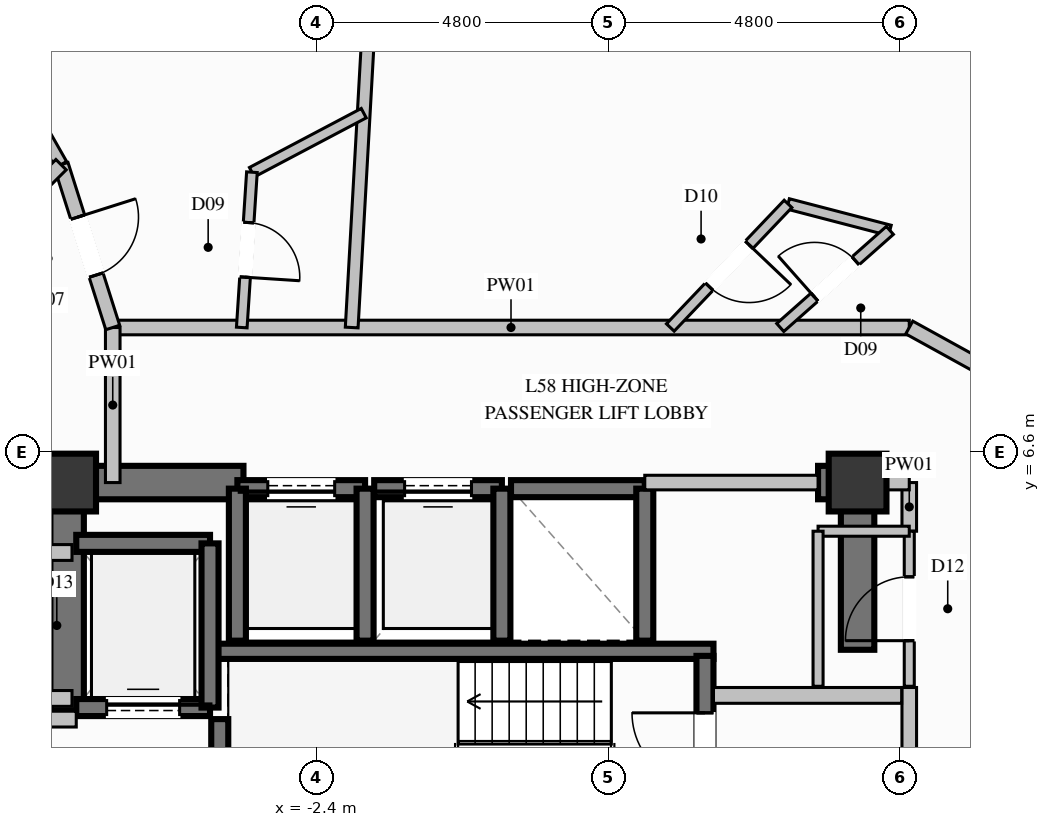
"""IFC4 building model, lengths in metres.
Left out: names, types, materials, properties, quantities, classifications, styles, units other than length and angle.
Written with IfcOpenShell. Run it as: python <this file> out.ifc"""

import sys

from ifc_helpers import new_model, si_unit, direction, frame, frame_2d, origin, origin_2d, place, context, subcontext, project, spatial, rectangle, extrude, element, fill, save


model = new_model("IFC4")
c1 = context("Model", 3, precision=1e-05, world=origin(), true_north=direction((0.0, 1.0)))
c2 = subcontext(c1, "Body", "Model", "MODEL_VIEW")
j1 = project(units=[si_unit("LENGTHUNIT", "METRE"), si_unit("PLANEANGLEUNIT", "RADIAN")], contexts=[c1])
p1 = place(None, origin())
s1 = spatial("IfcSite", under=j1, at=p1, CompositionType="ELEMENT")
p2 = place(p1, origin())
s2 = spatial("IfcBuilding", under=s1, at=p2, CompositionType="ELEMENT")
p3 = place(p2, frame((0.0, 0.0, 223.6)))
s3 = spatial("IfcBuildingStorey", under=s2, at=p3, CompositionType="ELEMENT", Elevation=223.6)
for number, where, z_axis, x_axis in (
    (1, (6.5, 6.1, 0.0), (0.0, 0.0, 1.0), (1.0, 0.0, 0.0)),
    (2, (-6.5, 6.1, 0.0), (0.0, 0.0, 1.0), (1.0, 0.0, 0.0)),
):
    element("IfcColumn", number, at=place(p3, frame(where, z_axis=z_axis, x_axis=x_axis)), inside=s3, PredefinedType="COLUMN", context=c2, shape_type="SweptSolid", body=[
        extrude(rectangle(XDim=0.95, YDim=0.95, at=origin_2d()), origin(), (0.0, 0.0, 1.0), 3.6),
    ])
p4 = place(p3, frame((-4.13, 3.325, 0.0), z_axis=(0.0, 0.0, 1.0), x_axis=(1.0, 0.0, 0.0)))
e3 = element("IfcWall", 3, at=p4, inside=s3, PredefinedType="SOLIDWALL", context=c2, shape_type="SweptSolid", body=[
    extrude(rectangle(XDim=8.26, YDim=0.25, at=frame_2d((4.13, 0.0))), origin(), (0.0, 0.0, 1.0), 3.6),
])
p5 = place(p3, frame((-6.225, 6.1, 0.0), z_axis=(0.0, 0.0, 1.0), x_axis=(1.0, 0.0, 0.0)))
e4 = element("IfcWall", 4, at=p5, inside=s3, PredefinedType="SHEAR", context=c2, shape_type="SweptSolid", body=[
    extrude(rectangle(XDim=2.625, YDim=0.55, at=frame_2d((1.312, 0.0))), origin(), (0.0, 0.0, 1.0), 3.6),
])
p6 = place(p3, frame((5.85, 6.1, 0.0), z_axis=(0.0, 0.0, 1.0), x_axis=(1.0, 0.0, 0.0)))
e5 = element("IfcWall", 5, at=p6, inside=s3, PredefinedType="SHEAR", context=c2, shape_type="SweptSolid", body=[
    extrude(rectangle(XDim=0.375, YDim=0.55, at=frame_2d((0.188, 0.0))), origin(), (0.0, 0.0, 1.0), 3.6),
])
p7 = place(p3, frame((-6.5, 2.35, 0.0), z_axis=(0.0, 0.0, 1.0), x_axis=(0.0, 1.0, 0.0)))
e6 = element("IfcWall", 6, at=p7, inside=s3, PredefinedType="SHEAR", context=c2, shape_type="SweptSolid", body=[
    extrude(rectangle(XDim=4.025, YDim=0.55, at=frame_2d((2.012, 0.0))), origin(), (0.0, 0.0, 1.0), 3.6),
])
p8 = place(p3, frame((6.5, 3.35, 0.0), z_axis=(0.0, 0.0, 1.0), x_axis=(0.0, 1.0, 0.0)))
e7 = element("IfcWall", 7, at=p8, inside=s3, PredefinedType="SHEAR", context=c2, shape_type="SweptSolid", body=[
    extrude(rectangle(XDim=3.025, YDim=0.55, at=frame_2d((1.512, 0.0))), origin(), (0.0, 0.0, 1.0), 3.6),
])
p9 = place(p3, frame((-1.6, 6.0, 0.0), z_axis=(0.0, 0.0, 1.0), x_axis=(-1.0, 0.0, 0.0)))
e8 = element("IfcWall", 8, at=p9, inside=s3, PredefinedType="SOLIDWALL", context=c2, shape_type="SweptSolid", body=[
    extrude(rectangle(XDim=2.1, YDim=0.28, at=frame_2d((1.05, 0.0))), origin(), (0.0, 0.0, 1.0), 3.36),
])
p10 = place(p9, frame((0.5, 0.0, 0.0)))
e9 = element("IfcOpeningElement", 9, at=p10, cuts=e8, PredefinedType="OPENING", context=c2, shape_type="SweptSolid", body=[
    extrude(rectangle(XDim=1.1, YDim=2.2, at=frame_2d((0.55, 1.1))), frame((0.0, 0.15, 0.0), z_axis=(0.0, -1.0, 0.0), x_axis=(1.0, 0.0, 0.0)), (0.0, 0.0, 1.0), 0.3),
])
for number, where, z_axis, x_axis in (
    (10, (-3.7, 6.0, 0.0), (0.0, 0.0, 1.0), (0.0, -1.0, 0.0)),
    (11, (-1.6, 3.5, 0.0), (0.0, 0.0, 1.0), (0.0, 1.0, 0.0)),
):
    element("IfcWall", number, at=place(p3, frame(where, z_axis=z_axis, x_axis=x_axis)), inside=s3, PredefinedType="SOLIDWALL", context=c2, shape_type="SweptSolid", body=[
        extrude(rectangle(XDim=2.5, YDim=0.28, at=frame_2d((1.25, 0.0))), origin(), (0.0, 0.0, 1.0), 3.36),
    ])
p11 = place(p3, frame((0.65, 6.0, 0.0), z_axis=(0.0, 0.0, 1.0), x_axis=(-1.0, 0.0, 0.0)))
e12 = element("IfcWall", 12, at=p11, inside=s3, PredefinedType="SOLIDWALL", context=c2, shape_type="SweptSolid", body=[
    extrude(rectangle(XDim=2.1, YDim=0.28, at=frame_2d((1.05, 0.0))), origin(), (0.0, 0.0, 1.0), 3.36),
])
p12 = place(p11, frame((0.5, 0.0, 0.0)))
e13 = element("IfcOpeningElement", 13, at=p12, cuts=e12, PredefinedType="OPENING", context=c2, shape_type="SweptSolid", body=[
    extrude(rectangle(XDim=1.1, YDim=2.2, at=frame_2d((0.55, 1.1))), frame((0.0, 0.15, 0.0), z_axis=(0.0, -1.0, 0.0), x_axis=(1.0, 0.0, 0.0)), (0.0, 0.0, 1.0), 0.3),
])
p13 = place(p3, frame((0.65, 3.5, 0.0), z_axis=(0.0, 0.0, 1.0), x_axis=(0.0, 1.0, 0.0)))
e14 = element("IfcWall", 14, at=p13, inside=s3, PredefinedType="SOLIDWALL", context=c2, shape_type="SweptSolid", body=[
    extrude(rectangle(XDim=2.5, YDim=0.28, at=frame_2d((1.25, 0.0))), origin(), (0.0, 0.0, 1.0), 3.36),
])
p14 = place(p3, frame((3.0, 6.0, 0.0), z_axis=(0.0, 0.0, 1.0), x_axis=(-1.0, 0.0, 0.0)))
e15 = element("IfcWall", 15, at=p14, inside=s3, PredefinedType="SOLIDWALL", context=c2, shape_type="SweptSolid", body=[
    extrude(rectangle(XDim=2.2, YDim=0.28, at=frame_2d((1.1, 0.0))), origin(), (0.0, 0.0, 1.0), 3.36),
])
p15 = place(p3, frame((3.0, 3.5, 0.0), z_axis=(0.0, 0.0, 1.0), x_axis=(0.0, 1.0, 0.0)))
e16 = element("IfcWall", 16, at=p15, inside=s3, PredefinedType="SOLIDWALL", context=c2, shape_type="SweptSolid", body=[
    extrude(rectangle(XDim=2.5, YDim=0.28, at=frame_2d((1.25, 0.0))), origin(), (0.0, 0.0, 1.0), 3.36),
])
p16 = place(p3, frame((-6.35, 2.4, 0.0), z_axis=(0.0, 0.0, 1.0), x_axis=(1.0, 0.0, 0.0)))
e17 = element("IfcWall", 17, at=p16, inside=s3, PredefinedType="SOLIDWALL", context=c2, shape_type="SweptSolid", body=[
    extrude(rectangle(XDim=2.2, YDim=0.28, at=frame_2d((1.1, 0.0))), origin(), (0.0, 0.0, 1.0), 3.36),
])
p17 = place(p16, frame((0.5, 0.0, 0.0)))
e18 = element("IfcOpeningElement", 18, at=p17, cuts=e17, PredefinedType="OPENING", context=c2, shape_type="SweptSolid", body=[
    extrude(rectangle(XDim=1.2, YDim=2.2, at=frame_2d((0.6, 1.1))), frame((0.0, 0.15, 0.0), z_axis=(0.0, -1.0, 0.0), x_axis=(1.0, 0.0, 0.0)), (0.0, 0.0, 1.0), 0.3),
])
p18 = place(p3, frame((-4.15, 5.1, 0.0), z_axis=(0.0, 0.0, 1.0), x_axis=(-1.0, 0.0, 0.0)))
e19 = element("IfcWall", 19, at=p18, inside=s3, PredefinedType="SOLIDWALL", context=c2, shape_type="SweptSolid", body=[
    extrude(rectangle(XDim=2.2, YDim=0.28, at=frame_2d((1.1, 0.0))), origin(), (0.0, 0.0, 1.0), 3.36),
])
p19 = place(p3, frame((-4.15, 2.4, 0.0), z_axis=(0.0, 0.0, 1.0), x_axis=(0.0, 1.0, 0.0)))
e20 = element("IfcWall", 20, at=p19, inside=s3, PredefinedType="SOLIDWALL", context=c2, shape_type="SweptSolid", body=[
    extrude(rectangle(XDim=2.7, YDim=0.28, at=frame_2d((1.35, 0.0))), origin(), (0.0, 0.0, 1.0), 3.36),
])
p20 = place(p3, frame((-3.99, -3.25, 0.0), z_axis=(0.0, 0.0, 1.0), x_axis=(0.0, 1.0, 0.0)))
e21 = element("IfcWall", 21, at=p20, inside=s3, PredefinedType="SOLIDWALL", context=c2, shape_type="SweptSolid", body=[
    extrude(rectangle(XDim=5.46, YDim=0.28, at=frame_2d((2.73, 0.0))), origin(), (0.0, 0.0, 1.0), 3.36),
])
p21 = place(p20, frame((0.937, 0.0, 0.0)))
e22 = element("IfcOpeningElement", 22, at=p21, cuts=e21, PredefinedType="OPENING", context=c2, shape_type="SweptSolid", body=[
    extrude(rectangle(XDim=1.2, YDim=2.2, at=frame_2d((0.6, 1.1))), frame((0.0, 0.15, 0.0), z_axis=(0.0, -1.0, 0.0), x_axis=(1.0, 0.0, 0.0)), (0.0, 0.0, 1.0), 0.3),
])
p22 = place(p3, frame((3.99, -2.21, 0.0), z_axis=(0.0, 0.0, 1.0), x_axis=(0.0, 1.0, 0.0)))
e23 = element("IfcWall", 23, at=p22, inside=s3, PredefinedType="SOLIDWALL", context=c2, shape_type="SweptSolid", body=[
    extrude(rectangle(XDim=5.46, YDim=0.28, at=frame_2d((2.73, 0.0))), origin(), (0.0, 0.0, 1.0), 3.36),
])
p23 = place(p22, frame((3.323, 0.0, 0.0)))
e24 = element("IfcOpeningElement", 24, at=p23, cuts=e23, PredefinedType="OPENING", context=c2, shape_type="SweptSolid", body=[
    extrude(rectangle(XDim=1.2, YDim=2.2, at=frame_2d((0.6, 1.1))), frame((0.0, 0.15, 0.0), z_axis=(0.0, -1.0, 0.0), x_axis=(1.0, 0.0, 0.0)), (0.0, 0.0, 1.0), 0.3),
])
p24 = place(p3, frame((-7.225, 2.21, 0.0), z_axis=(0.0, 0.0, 1.0), x_axis=(1.0, 0.0, 0.0)))
e25 = element("IfcWall", 25, at=p24, inside=s3, PredefinedType="PARTITIONING", context=c2, shape_type="SweptSolid", body=[
    extrude(rectangle(XDim=0.875, YDim=0.26, at=frame_2d((0.438, 0.0))), origin(), (0.0, 0.0, 1.0), 3.36),
])
p25 = place(p3, frame((7.35, -2.34, 0.0), z_axis=(0.0, 0.0, 1.0), x_axis=(0.0, 1.0, 0.0)))
e26 = element("IfcWall", 26, at=p25, inside=s3, PredefinedType="PARTITIONING", context=c2, shape_type="SweptSolid", body=[
    extrude(rectangle(XDim=5.07, YDim=0.24, at=frame_2d((2.535, 0.0))), origin(), (0.0, 0.0, 1.0), 2.445),
])
p26 = place(p25, frame((2.548, 0.0, 0.0)))
e27 = element("IfcOpeningElement", 27, at=p26, cuts=e26, PredefinedType="OPENING", context=c2, shape_type="SweptSolid", body=[
    extrude(rectangle(XDim=1.15, YDim=2.2, at=frame_2d((0.575, 1.1))), frame((0.0, 0.13, 0.0), z_axis=(0.0, -1.0, 0.0), x_axis=(1.0, 0.0, 0.0)), (0.0, 0.0, 1.0), 0.26),
])
p27 = place(p3, frame((4.13, 2.6, 0.0), z_axis=(0.0, 0.0, 1.0), x_axis=(1.0, 0.0, 0.0)))
e28 = element("IfcWall", 28, at=p27, inside=s3, PredefinedType="PARTITIONING", context=c2, shape_type="SweptSolid", body=[
    extrude(rectangle(XDim=3.095, YDim=0.26, at=frame_2d((1.548, 0.0))), origin(), (0.0, 0.0, 1.0), 3.36),
])
for number, where, z_axis, x_axis in (
    (29, (-7.35, 4.95, 0.0), (0.0, 0.0, 1.0), (1.0, 0.0, 0.0)),
    (30, (-7.35, 2.55, 0.0), (0.0, 0.0, 1.0), (1.0, 0.0, 0.0)),
):
    element("IfcWall", number, at=place(p3, frame(where, z_axis=z_axis, x_axis=x_axis)), inside=s3, PredefinedType="PARTITIONING", context=c2, shape_type="SweptSolid", body=[
        extrude(rectangle(XDim=0.93, YDim=0.26, at=frame_2d((0.465, 0.0))), origin(), (0.0, 0.0, 1.0), 3.36),
    ])
p28 = place(p3, frame((-5.75, 8.65, 0.0), z_axis=(0.0, 0.0, 1.0), x_axis=(1.0, 0.0, 0.0)))
e31 = element("IfcWall", 31, at=p28, inside=s3, PredefinedType="PARTITIONING", context=c2, shape_type="SweptSolid", body=[
    extrude(rectangle(XDim=13.1, YDim=0.24, at=frame_2d((6.55, 0.0))), origin(), (0.0, 0.0, 1.0), 3.36),
])
p29 = place(p3, frame((3.0, 6.1, 0.0), z_axis=(0.0, 0.0, 1.0), x_axis=(1.0, 0.0, 0.0)))
e32 = element("IfcWall", 32, at=p29, inside=s3, PredefinedType="PARTITIONING", context=c2, shape_type="SweptSolid", body=[
    extrude(rectangle(XDim=2.85, YDim=0.24, at=frame_2d((1.425, 0.0))), origin(), (0.0, 0.0, 1.0), 2.445),
])
p30 = place(p3, frame((7.35, 5.3, 0.0), z_axis=(0.0, 0.0, 1.0), x_axis=(0.0, 1.0, 0.0)))
e33 = element("IfcWall", 33, at=p30, inside=s3, PredefinedType="PARTITIONING", context=c2, shape_type="SweptSolid", body=[
    extrude(rectangle(XDim=0.8, YDim=0.24, at=frame_2d((0.4, 0.0))), origin(), (0.0, 0.0, 1.0), 2.445),
])
p31 = place(p3, frame((6.5, 6.1, 0.0), z_axis=(0.0, 0.0, 1.0), x_axis=(1.0, 0.0, 0.0)))
e34 = element("IfcWall", 34, at=p31, inside=s3, PredefinedType="PARTITIONING", context=c2, shape_type="SweptSolid", body=[
    extrude(rectangle(XDim=0.85, YDim=0.24, at=frame_2d((0.425, 0.0))), origin(), (0.0, 0.0, 1.0), 2.801),
])
p32 = place(p3, frame((-5.75, 6.1, 0.0), z_axis=(0.0, 0.0, 1.0), x_axis=(0.0, 1.0, 0.0)))
e35 = element("IfcWall", 35, at=p32, inside=s3, PredefinedType="PARTITIONING", context=c2, shape_type="SweptSolid", body=[
    extrude(rectangle(XDim=2.55, YDim=0.24, at=frame_2d((1.275, 0.0))), origin(), (0.0, 0.0, 1.0), 3.36),
])
p33 = place(p3, frame((-7.35, 6.1, 0.0), z_axis=(0.0, 0.0, 1.0), x_axis=(1.0, 0.0, 0.0)))
e36 = element("IfcWall", 36, at=p33, inside=s3, PredefinedType="PARTITIONING", context=c2, shape_type="SweptSolid", body=[
    extrude(rectangle(XDim=0.85, YDim=0.24, at=frame_2d((0.425, 0.0))), origin(), (0.0, 0.0, 1.0), 2.801),
])
p34 = place(p3, frame((7.35, 2.75, 0.0), z_axis=(0.0, 0.0, 1.0), x_axis=(0.0, 1.0, 0.0)))
e37 = element("IfcWall", 37, at=p34, inside=s3, PredefinedType="PARTITIONING", context=c2, shape_type="SweptSolid", body=[
    extrude(rectangle(XDim=2.55, YDim=0.165, at=frame_2d((1.275, 0.0))), origin(), (0.0, 0.0, 1.0), 3.36),
])
p35 = place(p34, frame((0.75, 0.0, 0.0)))
e38 = element("IfcOpeningElement", 38, at=p35, cuts=e37, PredefinedType="OPENING", context=c2, shape_type="SweptSolid", body=[
    extrude(rectangle(XDim=1.05, YDim=2.15, at=frame_2d((0.525, 1.075))), frame((0.0, 0.093, 0.0), z_axis=(0.0, -1.0, 0.0), x_axis=(1.0, 0.0, 0.0)), (0.0, 0.0, 1.0), 0.185),
])
p36 = place(p3, frame((7.35, 5.3, 0.0), z_axis=(0.0, 0.0, 1.0), x_axis=(-1.0, 0.0, 0.0)))
e39 = element("IfcWall", 39, at=p36, inside=s3, PredefinedType="PARTITIONING", context=c2, shape_type="SweptSolid", body=[
    extrude(rectangle(XDim=1.5, YDim=0.165, at=frame_2d((0.75, 0.0))), origin(), (0.0, 0.0, 1.0), 2.445),
])
p37 = place(p3, frame((5.85, 5.3, 0.0), z_axis=(0.0, 0.0, 1.0), x_axis=(0.0, -1.0, 0.0)))
e40 = element("IfcWall", 40, at=p37, inside=s3, PredefinedType="PARTITIONING", context=c2, shape_type="SweptSolid", body=[
    extrude(rectangle(XDim=2.55, YDim=0.165, at=frame_2d((1.275, 0.0))), origin(), (0.0, 0.0, 1.0), 2.445),
])
p38 = place(p3, frame((-6.6, 11.328, 0.0), z_axis=(0.0, 0.0, 1.0), x_axis=(-0.494753305644, 0.869033466878, 0.0)))
e41 = element("IfcWall", 41, at=p38, inside=s3, PredefinedType="PARTITIONING", context=c2, shape_type="SweptSolid", body=[
    extrude(rectangle(XDim=2.221, YDim=0.21, at=frame_2d((1.11, 0.0))), origin(), (0.0, 0.0, 1.0), 2.801),
])
p39 = place(p3, frame((5.356, 10.683, 0.0), z_axis=(0.0, 0.0, 1.0), x_axis=(0.967748954233, -0.25191657663, 0.0)))
e42 = element("IfcWall", 42, at=p39, inside=s3, PredefinedType="PLUMBINGWALL", context=c2, shape_type="SweptSolid", body=[
    extrude(rectangle(XDim=1.731, YDim=0.175, at=frame_2d((0.865, 0.0))), origin(), (0.0, 0.0, 1.0), 3.36),
])
p40 = place(p3, frame((5.356, 10.683, 0.0), z_axis=(0.0, 0.0, 1.0), x_axis=(-0.689590027436, -0.724199968283, 0.0)))
e43 = element("IfcWall", 43, at=p40, inside=s3, PredefinedType="PLUMBINGWALL", context=c2, shape_type="SweptSolid", body=[
    extrude(rectangle(XDim=2.808, YDim=0.175, at=frame_2d((1.404, 0.0))), origin(), (0.0, 0.0, 1.0), 3.36),
])
p41 = place(p40, frame((0.929, 0.0, 0.0)))
e44 = element("IfcOpeningElement", 44, at=p41, cuts=e43, PredefinedType="OPENING", context=c2, shape_type="SweptSolid", body=[
    extrude(rectangle(XDim=0.95, YDim=2.1, at=frame_2d((0.475, 1.05))), frame((0.0, 0.098, 0.0), z_axis=(0.0, -1.0, 0.0), x_axis=(1.0, 0.0, 0.0)), (0.0, 0.0, 1.0), 0.195),
])
p42 = place(p3, frame((5.228, 8.65, 0.0), z_axis=(0.0, 0.0, 1.0), x_axis=(0.748537869346, 0.663092043502, 0.0)))
e45 = element("IfcWall", 45, at=p42, inside=s3, PredefinedType="PLUMBINGWALL", context=c2, shape_type="SweptSolid", body=[
    extrude(rectangle(XDim=2.409, YDim=0.175, at=frame_2d((1.204, 0.0))), origin(), (0.0, 0.0, 1.0), 3.36),
])
p43 = place(p42, frame((0.754, 0.0, 0.0)))
e46 = element("IfcOpeningElement", 46, at=p43, cuts=e45, PredefinedType="OPENING", context=c2, shape_type="SweptSolid", body=[
    extrude(rectangle(XDim=0.9, YDim=2.1, at=frame_2d((0.45, 1.05))), frame((0.0, 0.098, 0.0), z_axis=(0.0, -1.0, 0.0), x_axis=(1.0, 0.0, 0.0)), (0.0, 0.0, 1.0), 0.195),
])
p44 = place(p3, frame((7.35, 8.65, 0.0), z_axis=(0.0, 0.0, 1.0), x_axis=(0.875674474849, -0.482901867979, 0.0)))
e47 = element("IfcWall", 47, at=p44, inside=s3, PredefinedType="PARTITIONING", context=c2, shape_type="SweptSolid", body=[
    extrude(rectangle(XDim=4.193, YDim=0.24, at=frame_2d((2.097, 0.0))), origin(), (0.0, 0.0, 1.0), 3.36),
])
p45 = place(p44, frame((1.597, 0.0, 0.0)))
e48 = element("IfcOpeningElement", 48, at=p45, cuts=e47, PredefinedType="OPENING", context=c2, shape_type="SweptSolid", body=[
    extrude(rectangle(XDim=1.0, YDim=2.2, at=frame_2d((0.5, 1.1))), frame((0.0, 0.13, 0.0), z_axis=(0.0, -1.0, 0.0), x_axis=(1.0, 0.0, 0.0)), (0.0, 0.0, 1.0), 0.26),
])
p46 = place(p3, frame((-1.82, 8.65, 0.0), z_axis=(0.0, 0.0, 1.0), x_axis=(0.056069425864, 0.998426872376, 0.0)))
e49 = element("IfcWall", 49, at=p46, inside=s3, PredefinedType="PARTITIONING", context=c2, shape_type="SweptSolid", body=[
    extrude(rectangle(XDim=12.61, YDim=0.21, at=frame_2d((6.305, 0.0))), origin(), (0.0, 0.0, 1.0), 3.36),
])
p47 = place(p3, frame((-3.461, 11.204, 0.0), z_axis=(0.0, 0.0, 1.0), x_axis=(0.884298578972, 0.466921859874, 0.0)))
e50 = element("IfcWall", 50, at=p47, inside=s3, PredefinedType="PLUMBINGWALL", context=c2, shape_type="SweptSolid", body=[
    extrude(rectangle(XDim=2.079, YDim=0.175, at=frame_2d((1.04, 0.0))), origin(), (0.0, 0.0, 1.0), 3.36),
])
p48 = place(p3, frame((-3.461, 11.204, 0.0), z_axis=(0.0, 0.0, 1.0), x_axis=(-0.065240183473, -0.997869589907, 0.0)))
e51 = element("IfcWall", 51, at=p48, inside=s3, PredefinedType="PLUMBINGWALL", context=c2, shape_type="SweptSolid", body=[
    extrude(rectangle(XDim=2.56, YDim=0.175, at=frame_2d((1.28, 0.0))), origin(), (0.0, 0.0, 1.0), 3.36),
])
p49 = place(p48, frame((0.83, 0.0, 0.0)))
e52 = element("IfcOpeningElement", 52, at=p49, cuts=e51, PredefinedType="OPENING", context=c2, shape_type="SweptSolid", body=[
    extrude(rectangle(XDim=0.9, YDim=2.1, at=frame_2d((0.45, 1.05))), frame((0.0, 0.098, 0.0), z_axis=(0.0, -1.0, 0.0), x_axis=(1.0, 0.0, 0.0)), (0.0, 0.0, 1.0), 0.195),
])
p50 = place(p3, frame((-6.6, 11.328, 0.0), z_axis=(0.0, 0.0, 1.0), x_axis=(0.30256159068, -0.953129835775, 0.0)))
e53 = element("IfcWall", 53, at=p50, inside=s3, PredefinedType="PARTITIONING", context=c2, shape_type="SweptSolid", body=[
    extrude(rectangle(XDim=2.81, YDim=0.24, at=frame_2d((1.405, 0.0))), origin(), (0.0, 0.0, 1.0), 3.36),
])
p51 = place(p50, frame((0.905, 0.0, 0.0)))
e54 = element("IfcOpeningElement", 54, at=p51, cuts=e53, PredefinedType="OPENING", context=c2, shape_type="SweptSolid", body=[
    extrude(rectangle(XDim=1.0, YDim=2.2, at=frame_2d((0.5, 1.1))), frame((0.0, 0.13, 0.0), z_axis=(0.0, -1.0, 0.0), x_axis=(1.0, 0.0, 0.0)), (0.0, 0.0, 1.0), 0.26),
])
p52 = place(p3, frame((-6.6, 11.328, 0.0), z_axis=(0.0, 0.0, 1.0), x_axis=(-0.708544738437, -0.705665893772, 0.0)))
e55 = element("IfcWall", 55, at=p52, inside=s3, PredefinedType="PARTITIONING", context=c2, shape_type="SweptSolid", body=[
    extrude(rectangle(XDim=2.799, YDim=0.24, at=frame_2d((1.399, 0.0))), origin(), (0.0, 0.0, 1.0), 3.36),
])
p53 = place(p10, origin())
e56 = element("IfcDoor", 56, at=p53, inside=s3, OperationType="SLIDING_TO_LEFT", PredefinedType="DOOR", context=c2, shape_type="SweptSolid", body=[
    extrude(rectangle(XDim=1.1, YDim=2.2, at=frame_2d((0.55, 1.1))), frame((0.0, 0.025, 0.0), z_axis=(0.0, -1.0, 0.0), x_axis=(1.0, 0.0, 0.0)), (0.0, 0.0, 1.0), 0.05),
])
fill(e9, e56)
p54 = place(p12, origin())
e57 = element("IfcDoor", 57, at=p54, inside=s3, OperationType="SLIDING_TO_LEFT", PredefinedType="DOOR", context=c2, shape_type="SweptSolid", body=[
    extrude(rectangle(XDim=1.1, YDim=2.2, at=frame_2d((0.55, 1.1))), frame((0.0, 0.025, 0.0), z_axis=(0.0, -1.0, 0.0), x_axis=(1.0, 0.0, 0.0)), (0.0, 0.0, 1.0), 0.05),
])
fill(e13, e57)
p55 = place(p17, origin())
e58 = element("IfcDoor", 58, at=p55, inside=s3, OperationType="SLIDING_TO_LEFT", PredefinedType="DOOR", context=c2, shape_type="SweptSolid", body=[
    extrude(rectangle(XDim=1.2, YDim=2.2, at=frame_2d((0.6, 1.1))), frame((0.0, 0.025, 0.0), z_axis=(0.0, -1.0, 0.0), x_axis=(1.0, 0.0, 0.0)), (0.0, 0.0, 1.0), 0.05),
])
fill(e18, e58)
p56 = place(p23, origin())
e59 = element("IfcDoor", 59, at=p56, inside=s3, OperationType="SINGLE_SWING_RIGHT", PredefinedType="DOOR", context=c2, shape_type="SweptSolid", body=[
    extrude(rectangle(XDim=1.2, YDim=2.2, at=frame_2d((0.6, 1.1))), frame((0.0, 0.025, 0.0), z_axis=(0.0, -1.0, 0.0), x_axis=(1.0, 0.0, 0.0)), (0.0, 0.0, 1.0), 0.05),
])
fill(e24, e59)
p57 = place(p35, origin())
e60 = element("IfcDoor", 60, at=p57, inside=s3, OperationType="SINGLE_SWING_LEFT", PredefinedType="DOOR", context=c2, shape_type="SweptSolid", body=[
    extrude(rectangle(XDim=1.05, YDim=2.15, at=frame_2d((0.525, 1.075))), frame((0.0, 0.025, 0.0), z_axis=(0.0, -1.0, 0.0), x_axis=(1.0, 0.0, 0.0)), (0.0, 0.0, 1.0), 0.05),
])
fill(e38, e60)
p58 = place(p43, origin())
e61 = element("IfcDoor", 61, at=p58, inside=s3, OperationType="SINGLE_SWING_LEFT", PredefinedType="DOOR", context=c2, shape_type="SweptSolid", body=[
    extrude(rectangle(XDim=0.9, YDim=2.1, at=frame_2d((0.45, 1.05))), frame((0.0, 0.025, 0.0), z_axis=(0.0, -1.0, 0.0), x_axis=(1.0, 0.0, 0.0)), (0.0, 0.0, 1.0), 0.05),
])
fill(e46, e61)
p59 = place(p41, origin())
e62 = element("IfcDoor", 62, at=p59, inside=s3, OperationType="SINGLE_SWING_LEFT", PredefinedType="DOOR", context=c2, shape_type="SweptSolid", body=[
    extrude(rectangle(XDim=0.95, YDim=2.1, at=frame_2d((0.475, 1.05))), frame((0.0, 0.025, 0.0), z_axis=(0.0, -1.0, 0.0), x_axis=(1.0, 0.0, 0.0)), (0.0, 0.0, 1.0), 0.05),
])
fill(e44, e62)
p60 = place(p49, origin())
e63 = element("IfcDoor", 63, at=p60, inside=s3, OperationType="SINGLE_SWING_RIGHT", PredefinedType="DOOR", context=c2, shape_type="SweptSolid", body=[
    extrude(rectangle(XDim=0.9, YDim=2.1, at=frame_2d((0.45, 1.05))), frame((0.0, 0.025, 0.0), z_axis=(0.0, -1.0, 0.0), x_axis=(1.0, 0.0, 0.0)), (0.0, 0.0, 1.0), 0.05),
])
fill(e52, e63)
p61 = place(p51, origin())
e64 = element("IfcDoor", 64, at=p61, inside=s3, OperationType="SINGLE_SWING_LEFT", PredefinedType="DOOR", context=c2, shape_type="SweptSolid", body=[
    extrude(rectangle(XDim=1.0, YDim=2.2, at=frame_2d((0.5, 1.1))), frame((0.0, 0.025, 0.0), z_axis=(0.0, -1.0, 0.0), x_axis=(1.0, 0.0, 0.0)), (0.0, 0.0, 1.0), 0.05),
])
fill(e54, e64)
save(model, sys.argv[1])
